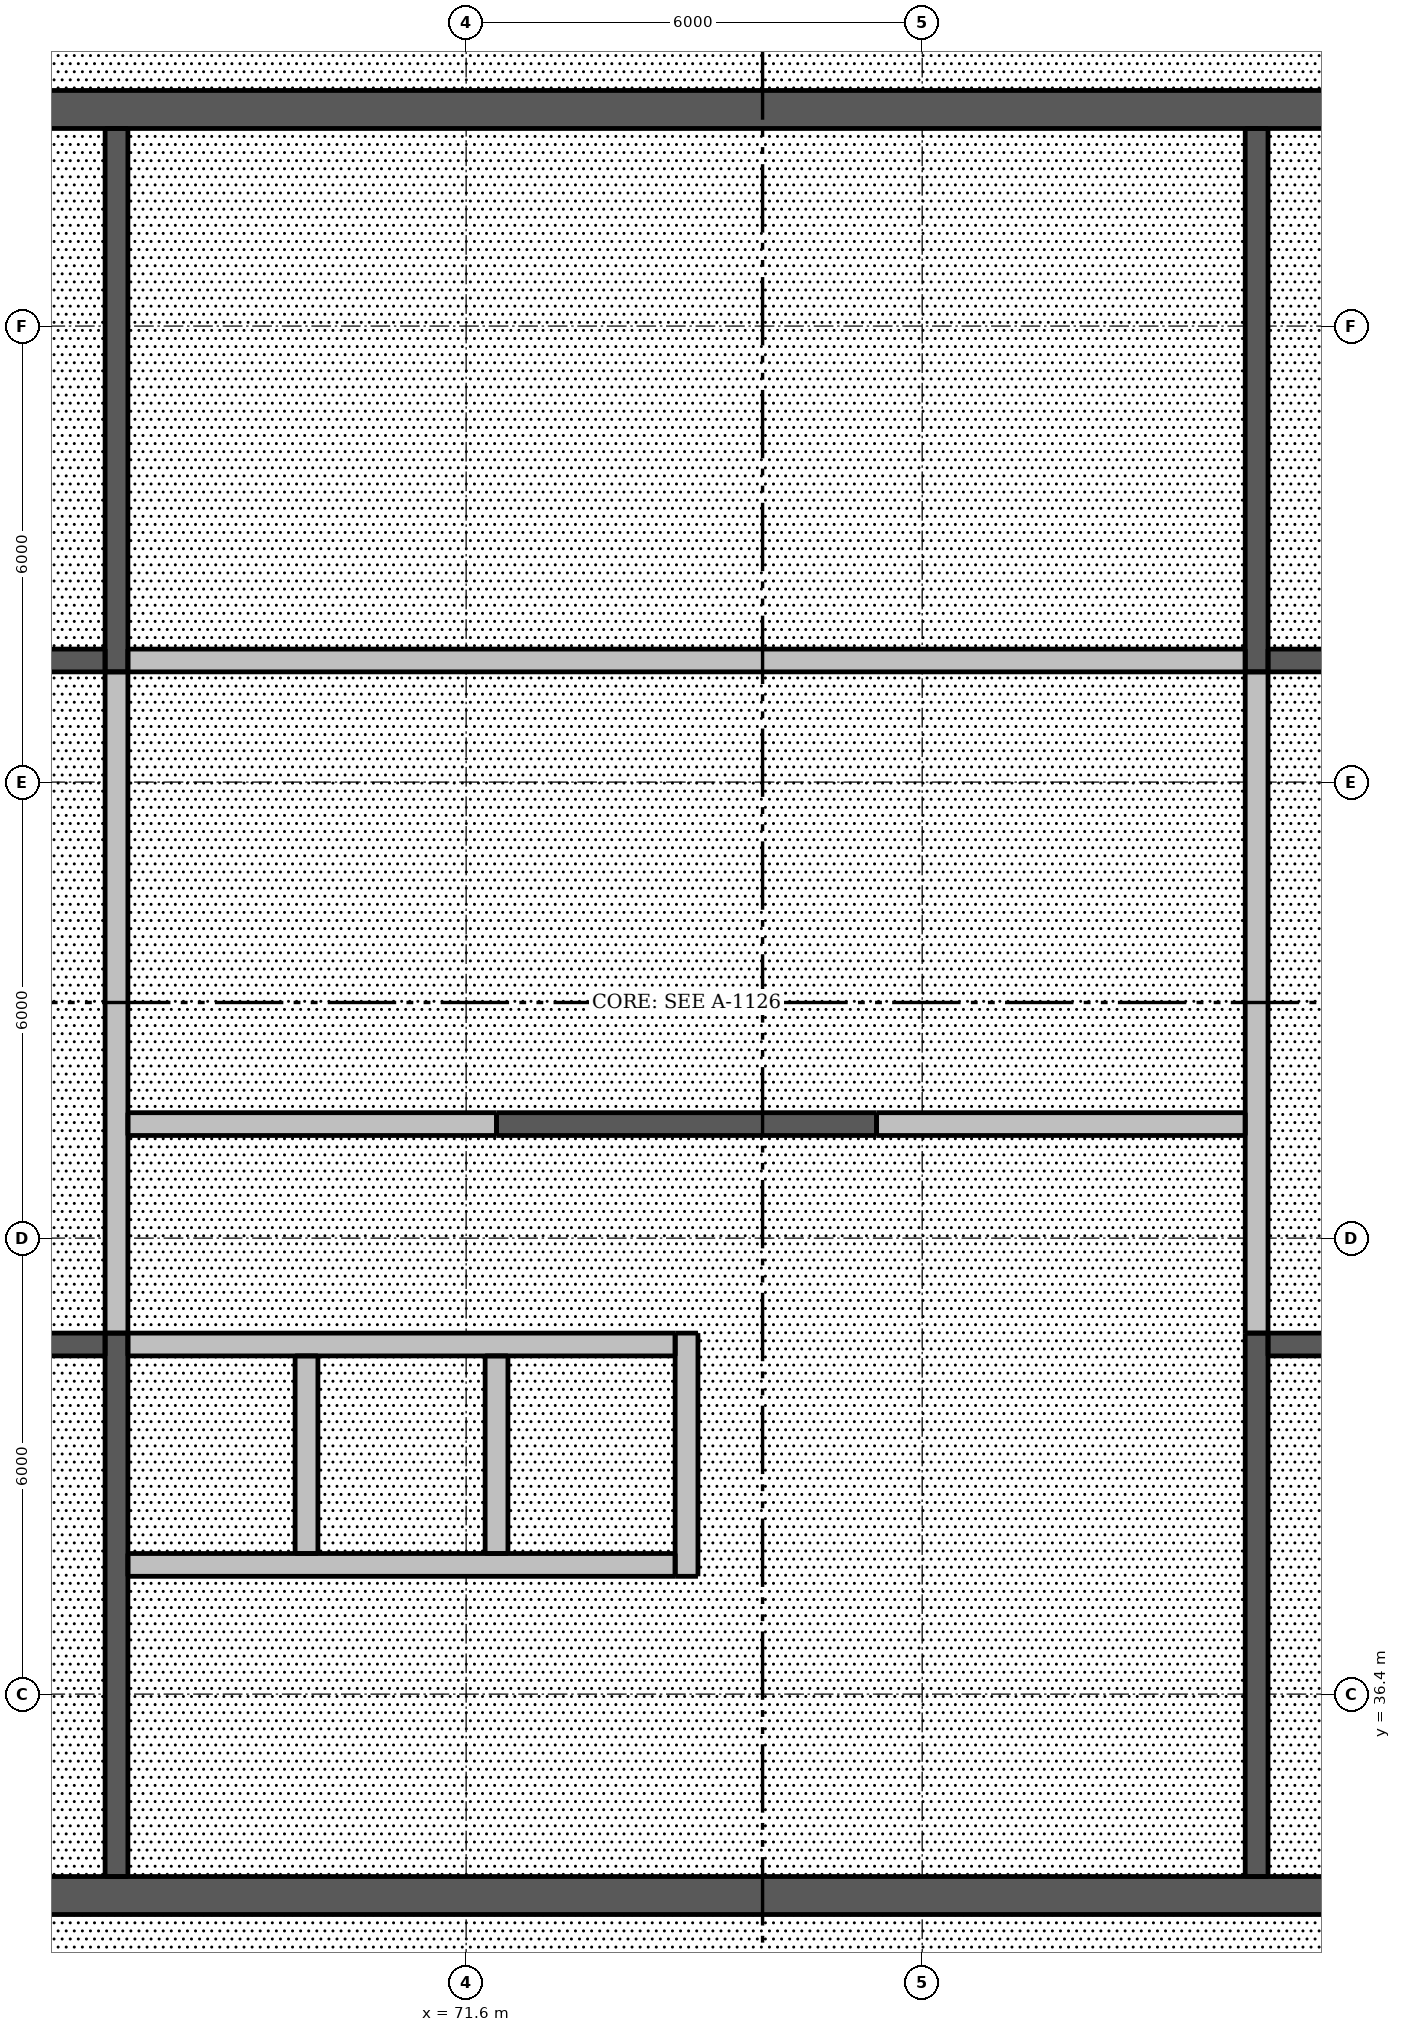
"""IFC4 building model, lengths in metres.
Left out: names, types, materials, properties, quantities, classifications, styles, units other than length and angle.
Written with IfcOpenShell. Run it as: python <this file> out.ifc"""

import sys

from ifc_helpers import new_model, si_unit, direction, frame, frame_2d, origin, place, context, subcontext, project, spatial, rectangle, extrude, element, fill, save


model = new_model("IFC4")
c1 = context("Model", 3, precision=1e-05, world=origin(), true_north=direction((0.0, 1.0)))
c2 = subcontext(c1, "Body", "Model", "MODEL_VIEW")
j1 = project(units=[si_unit("LENGTHUNIT", "METRE"), si_unit("PLANEANGLEUNIT", "RADIAN")], contexts=[c1])
p1 = place(None, origin())
s1 = spatial("IfcSite", under=j1, at=p1, CompositionType="ELEMENT")
p2 = place(p1, origin())
s2 = spatial("IfcBuilding", under=s1, at=p2, CompositionType="ELEMENT")
p3 = place(p2, frame((0.0, 0.0, 298.0)))
s3 = spatial("IfcBuildingStorey", under=s2, at=p3, CompositionType="ELEMENT", Elevation=298.0)
p4 = place(p3, frame((62.5, 33.75, 0.0), z_axis=(0.0, 0.0, 1.0), x_axis=(1.0, 0.0, 0.0)))
e1 = element("IfcWall", 1, at=p4, inside=s3, PredefinedType="SHEAR", context=c2, shape_type="SweptSolid", body=[
    extrude(rectangle(XDim=24.0, YDim=0.5, at=frame_2d((12.0, 0.0))), origin(), (0.0, 0.0, 1.0), 3.3),
])
p5 = place(p4, frame((1.875, 0.0, 0.0)))
e2 = element("IfcOpeningElement", 2, at=p5, cuts=e1, PredefinedType="OPENING", context=c2, shape_type="SweptSolid", body=[
    extrude(rectangle(XDim=1.1, YDim=2.1, at=frame_2d((0.55, 1.05))), frame((0.0, 0.26, 0.0), z_axis=(0.0, -1.0, 0.0), x_axis=(1.0, 0.0, 0.0)), (0.0, 0.0, 1.0), 0.52),
])
p6 = place(p4, frame((21.025, 0.0, 0.0)))
e3 = element("IfcOpeningElement", 3, at=p6, cuts=e1, PredefinedType="OPENING", context=c2, shape_type="SweptSolid", body=[
    extrude(rectangle(XDim=1.1, YDim=2.1, at=frame_2d((0.55, 1.05))), frame((0.0, 0.26, 0.0), z_axis=(0.0, -1.0, 0.0), x_axis=(1.0, 0.0, 0.0)), (0.0, 0.0, 1.0), 0.52),
])
p7 = place(p4, frame((11.55, 0.0, 0.0)))
e4 = element("IfcOpeningElement", 4, at=p7, cuts=e1, PredefinedType="OPENING", context=c2, shape_type="SweptSolid", body=[
    extrude(rectangle(XDim=0.9, YDim=2.1, at=frame_2d((0.45, 1.05))), frame((0.0, 0.26, 0.0), z_axis=(0.0, -1.0, 0.0), x_axis=(1.0, 0.0, 0.0)), (0.0, 0.0, 1.0), 0.52),
])
p8 = place(p3, frame((62.5, 57.25, 0.0), z_axis=(0.0, 0.0, 1.0), x_axis=(1.0, 0.0, 0.0)))
e5 = element("IfcWall", 5, at=p8, inside=s3, PredefinedType="SHEAR", context=c2, shape_type="SweptSolid", body=[
    extrude(rectangle(XDim=24.0, YDim=0.5, at=frame_2d((12.0, 0.0))), origin(), (0.0, 0.0, 1.0), 3.3),
])
p9 = place(p8, frame((21.025, 0.0, 0.0)))
e6 = element("IfcOpeningElement", 6, at=p9, cuts=e5, PredefinedType="OPENING", context=c2, shape_type="SweptSolid", body=[
    extrude(rectangle(XDim=1.1, YDim=2.1, at=frame_2d((0.55, 1.05))), frame((0.0, 0.26, 0.0), z_axis=(0.0, -1.0, 0.0), x_axis=(1.0, 0.0, 0.0)), (0.0, 0.0, 1.0), 0.52),
])
p10 = place(p8, frame((1.875, 0.0, 0.0)))
e7 = element("IfcOpeningElement", 7, at=p10, cuts=e5, PredefinedType="OPENING", context=c2, shape_type="SweptSolid", body=[
    extrude(rectangle(XDim=1.1, YDim=2.1, at=frame_2d((0.55, 1.05))), frame((0.0, 0.26, 0.0), z_axis=(0.0, -1.0, 0.0), x_axis=(1.0, 0.0, 0.0)), (0.0, 0.0, 1.0), 0.52),
])
p11 = place(p8, frame((11.55, 0.0, 0.0)))
e8 = element("IfcOpeningElement", 8, at=p11, cuts=e5, PredefinedType="OPENING", context=c2, shape_type="SweptSolid", body=[
    extrude(rectangle(XDim=0.9, YDim=2.1, at=frame_2d((0.45, 1.05))), frame((0.0, 0.26, 0.0), z_axis=(0.0, -1.0, 0.0), x_axis=(1.0, 0.0, 0.0)), (0.0, 0.0, 1.0), 0.52),
])
p12 = place(p3, frame((72.0, 43.9, 0.0), z_axis=(0.0, 0.0, 1.0), x_axis=(1.0, 0.0, 0.0)))
e9 = element("IfcWall", 9, at=p12, inside=s3, PredefinedType="SHEAR", context=c2, shape_type="SweptSolid", body=[
    extrude(rectangle(XDim=5.0, YDim=0.3, at=frame_2d((2.5, 0.0))), origin(), (0.0, 0.0, 1.0), 3.3),
])
p13 = place(p3, frame((67.0, 34.0, 0.0), z_axis=(0.0, 0.0, 1.0), x_axis=(0.0, 1.0, 0.0)))
e10 = element("IfcWall", 10, at=p13, inside=s3, PredefinedType="SHEAR", context=c2, shape_type="SweptSolid", body=[
    extrude(rectangle(XDim=7.15, YDim=0.3, at=frame_2d((3.575, 0.0))), origin(), (0.0, 0.0, 1.0), 3.3),
])
p14 = place(p13, frame((0.2, 0.0, 0.0)))
e11 = element("IfcOpeningElement", 11, at=p14, cuts=e10, PredefinedType="OPENING", context=c2, shape_type="SweptSolid", body=[
    extrude(rectangle(XDim=1.1, YDim=2.1, at=frame_2d((0.55, 1.05))), frame((0.0, 0.16, 0.0), z_axis=(0.0, -1.0, 0.0), x_axis=(1.0, 0.0, 0.0)), (0.0, 0.0, 1.0), 0.32),
])
p15 = place(p3, frame((67.0, 41.15, 0.0), z_axis=(0.0, 0.0, 1.0), x_axis=(0.0, 1.0, 0.0)))
e12 = element("IfcWall", 12, at=p15, inside=s3, PredefinedType="PARTITIONING", context=c2, shape_type="SweptSolid", body=[
    extrude(rectangle(XDim=8.7, YDim=0.3, at=frame_2d((4.35, 0.0))), origin(), (0.0, 0.0, 1.0), 3.3),
])
p16 = place(p15, frame((3.9, 0.0, 0.0)))
e13 = element("IfcOpeningElement", 13, at=p16, cuts=e12, PredefinedType="OPENING", context=c2, shape_type="SweptSolid", body=[
    extrude(rectangle(XDim=0.9, YDim=2.1, at=frame_2d((0.45, 1.05))), frame((0.0, 0.16, 0.0), z_axis=(0.0, -1.0, 0.0), x_axis=(1.0, 0.0, 0.0)), (0.0, 0.0, 1.0), 0.32),
])
p17 = place(p3, frame((67.0, 49.85, 0.0), z_axis=(0.0, 0.0, 1.0), x_axis=(0.0, 1.0, 0.0)))
e14 = element("IfcWall", 14, at=p17, inside=s3, PredefinedType="SHEAR", context=c2, shape_type="SweptSolid", body=[
    extrude(rectangle(XDim=7.15, YDim=0.3, at=frame_2d((3.575, 0.0))), origin(), (0.0, 0.0, 1.0), 3.3),
])
p18 = place(p17, frame((5.85, 0.0, 0.0)))
e15 = element("IfcOpeningElement", 15, at=p18, cuts=e14, PredefinedType="OPENING", context=c2, shape_type="SweptSolid", body=[
    extrude(rectangle(XDim=1.1, YDim=2.1, at=frame_2d((0.55, 1.05))), frame((0.0, 0.16, 0.0), z_axis=(0.0, -1.0, 0.0), x_axis=(1.0, 0.0, 0.0)), (0.0, 0.0, 1.0), 0.32),
])
p19 = place(p3, frame((82.0, 34.0, 0.0), z_axis=(0.0, 0.0, 1.0), x_axis=(0.0, 1.0, 0.0)))
e16 = element("IfcWall", 16, at=p19, inside=s3, PredefinedType="SHEAR", context=c2, shape_type="SweptSolid", body=[
    extrude(rectangle(XDim=7.15, YDim=0.3, at=frame_2d((3.575, 0.0))), origin(), (0.0, 0.0, 1.0), 3.3),
])
p20 = place(p19, frame((0.2, 0.0, 0.0)))
e17 = element("IfcOpeningElement", 17, at=p20, cuts=e16, PredefinedType="OPENING", context=c2, shape_type="SweptSolid", body=[
    extrude(rectangle(XDim=1.1, YDim=2.1, at=frame_2d((0.55, 1.05))), frame((0.0, 0.16, 0.0), z_axis=(0.0, -1.0, 0.0), x_axis=(1.0, 0.0, 0.0)), (0.0, 0.0, 1.0), 0.32),
])
p21 = place(p3, frame((82.0, 41.15, 0.0), z_axis=(0.0, 0.0, 1.0), x_axis=(0.0, 1.0, 0.0)))
e18 = element("IfcWall", 18, at=p21, inside=s3, PredefinedType="PARTITIONING", context=c2, shape_type="SweptSolid", body=[
    extrude(rectangle(XDim=8.7, YDim=0.3, at=frame_2d((4.35, 0.0))), origin(), (0.0, 0.0, 1.0), 3.3),
])
p22 = place(p21, frame((3.9, 0.0, 0.0)))
e19 = element("IfcOpeningElement", 19, at=p22, cuts=e18, PredefinedType="OPENING", context=c2, shape_type="SweptSolid", body=[
    extrude(rectangle(XDim=0.9, YDim=2.1, at=frame_2d((0.45, 1.05))), frame((0.0, 0.16, 0.0), z_axis=(0.0, -1.0, 0.0), x_axis=(1.0, 0.0, 0.0)), (0.0, 0.0, 1.0), 0.32),
])
p23 = place(p3, frame((82.0, 49.85, 0.0), z_axis=(0.0, 0.0, 1.0), x_axis=(0.0, 1.0, 0.0)))
e20 = element("IfcWall", 20, at=p23, inside=s3, PredefinedType="SHEAR", context=c2, shape_type="SweptSolid", body=[
    extrude(rectangle(XDim=7.15, YDim=0.3, at=frame_2d((3.575, 0.0))), origin(), (0.0, 0.0, 1.0), 3.3),
])
p24 = place(p23, frame((5.85, 0.0, 0.0)))
e21 = element("IfcOpeningElement", 21, at=p24, cuts=e20, PredefinedType="OPENING", context=c2, shape_type="SweptSolid", body=[
    extrude(rectangle(XDim=1.1, YDim=2.1, at=frame_2d((0.55, 1.05))), frame((0.0, 0.16, 0.0), z_axis=(0.0, -1.0, 0.0), x_axis=(1.0, 0.0, 0.0)), (0.0, 0.0, 1.0), 0.32),
])
for number, where, z_axis, x_axis in (
    (22, (63.0, 41.0, 0.0), (0.0, 0.0, 1.0), (1.0, 0.0, 0.0)),
    (23, (82.15, 41.0, 0.0), (0.0, 0.0, 1.0), (1.0, 0.0, 0.0)),
    (24, (63.0, 50.0, 0.0), (0.0, 0.0, 1.0), (1.0, 0.0, 0.0)),
    (25, (82.15, 50.0, 0.0), (0.0, 0.0, 1.0), (1.0, 0.0, 0.0)),
):
    element("IfcWall", number, at=place(p3, frame(where, z_axis=z_axis, x_axis=x_axis)), inside=s3, PredefinedType="SHEAR", context=c2, shape_type="SweptSolid", body=[
        extrude(rectangle(XDim=3.85, YDim=0.3, at=frame_2d((1.925, 0.0))), origin(), (0.0, 0.0, 1.0), 3.3),
    ])
p25 = place(p3, frame((67.15, 50.0, 0.0), z_axis=(0.0, 0.0, 1.0), x_axis=(1.0, 0.0, 0.0)))
e26 = element("IfcWall", 26, at=p25, inside=s3, PredefinedType="PARTITIONING", context=c2, shape_type="SweptSolid", body=[
    extrude(rectangle(XDim=14.7, YDim=0.3, at=frame_2d((7.35, 0.0))), origin(), (0.0, 0.0, 1.0), 3.3),
])
p26 = place(p25, frame((6.9, 0.0, 0.0)))
e27 = element("IfcOpeningElement", 27, at=p26, cuts=e26, PredefinedType="OPENING", context=c2, shape_type="SweptSolid", body=[
    extrude(rectangle(XDim=0.9, YDim=2.1, at=frame_2d((0.45, 1.05))), frame((0.0, 0.16, 0.0), z_axis=(0.0, -1.0, 0.0), x_axis=(1.0, 0.0, 0.0)), (0.0, 0.0, 1.0), 0.32),
])
p27 = place(p3, frame((67.15, 43.9, 0.0), z_axis=(0.0, 0.0, 1.0), x_axis=(1.0, 0.0, 0.0)))
e28 = element("IfcWall", 28, at=p27, inside=s3, PredefinedType="PARTITIONING", context=c2, shape_type="SweptSolid", body=[
    extrude(rectangle(XDim=4.85, YDim=0.3, at=frame_2d((2.425, 0.0))), origin(), (0.0, 0.0, 1.0), 3.3),
])
p28 = place(p27, frame((1.9, 0.0, 0.0)))
e29 = element("IfcOpeningElement", 29, at=p28, cuts=e28, PredefinedType="OPENING", context=c2, shape_type="SweptSolid", body=[
    extrude(rectangle(XDim=0.9, YDim=2.1, at=frame_2d((0.45, 1.05))), frame((0.0, 0.16, 0.0), z_axis=(0.0, -1.0, 0.0), x_axis=(1.0, 0.0, 0.0)), (0.0, 0.0, 1.0), 0.32),
])
p29 = place(p3, frame((77.0, 43.9, 0.0), z_axis=(0.0, 0.0, 1.0), x_axis=(1.0, 0.0, 0.0)))
e30 = element("IfcWall", 30, at=p29, inside=s3, PredefinedType="PARTITIONING", context=c2, shape_type="SweptSolid", body=[
    extrude(rectangle(XDim=4.85, YDim=0.3, at=frame_2d((2.425, 0.0))), origin(), (0.0, 0.0, 1.0), 3.3),
])
p30 = place(p3, frame((67.15, 38.1, 0.0), z_axis=(0.0, 0.0, 1.0), x_axis=(1.0, 0.0, 0.0)))
e31 = element("IfcWall", 31, at=p30, inside=s3, PredefinedType="PARTITIONING", context=c2, shape_type="SweptSolid", body=[
    extrude(rectangle(XDim=7.2, YDim=0.3, at=frame_2d((3.6, 0.0))), origin(), (0.0, 0.0, 1.0), 3.3),
])
p31 = place(p30, frame((0.55, 0.0, 0.0)))
e32 = element("IfcOpeningElement", 32, at=p31, cuts=e31, PredefinedType="OPENING", context=c2, shape_type="SweptSolid", body=[
    extrude(rectangle(XDim=1.1, YDim=2.1, at=frame_2d((0.55, 1.05))), frame((0.0, 0.16, 0.0), z_axis=(0.0, -1.0, 0.0), x_axis=(1.0, 0.0, 0.0)), (0.0, 0.0, 1.0), 0.32),
])
p32 = place(p30, frame((3.05, 0.0, 0.0)))
e33 = element("IfcOpeningElement", 33, at=p32, cuts=e31, PredefinedType="OPENING", context=c2, shape_type="SweptSolid", body=[
    extrude(rectangle(XDim=1.1, YDim=2.1, at=frame_2d((0.55, 1.05))), frame((0.0, 0.16, 0.0), z_axis=(0.0, -1.0, 0.0), x_axis=(1.0, 0.0, 0.0)), (0.0, 0.0, 1.0), 0.32),
])
p33 = place(p30, frame((5.5, 0.0, 0.0)))
e34 = element("IfcOpeningElement", 34, at=p33, cuts=e31, PredefinedType="OPENING", context=c2, shape_type="SweptSolid", body=[
    extrude(rectangle(XDim=1.2, YDim=2.1, at=frame_2d((0.6, 1.05))), frame((0.0, 0.16, 0.0), z_axis=(0.0, -1.0, 0.0), x_axis=(1.0, 0.0, 0.0)), (0.0, 0.0, 1.0), 0.32),
])
p34 = place(p3, frame((67.15, 41.0, 0.0), z_axis=(0.0, 0.0, 1.0), x_axis=(1.0, 0.0, 0.0)))
e35 = element("IfcWall", 35, at=p34, inside=s3, PredefinedType="PARTITIONING", context=c2, shape_type="SweptSolid", body=[
    extrude(rectangle(XDim=7.2, YDim=0.3, at=frame_2d((3.6, 0.0))), origin(), (0.0, 0.0, 1.0), 3.3),
])
for number, where, z_axis, x_axis in (
    (36, (69.5, 38.25, 0.0), (0.0, 0.0, 1.0), (0.0, 1.0, 0.0)),
    (37, (72.0, 38.25, 0.0), (0.0, 0.0, 1.0), (0.0, 1.0, 0.0)),
):
    element("IfcWall", number, at=place(p3, frame(where, z_axis=z_axis, x_axis=x_axis)), inside=s3, PredefinedType="PARTITIONING", context=c2, shape_type="SweptSolid", body=[
        extrude(rectangle(XDim=2.6, YDim=0.3, at=frame_2d((1.3, 0.0))), origin(), (0.0, 0.0, 1.0), 3.3),
    ])
p35 = place(p3, frame((74.5, 37.95, 0.0), z_axis=(0.0, 0.0, 1.0), x_axis=(0.0, 1.0, 0.0)))
e38 = element("IfcWall", 38, at=p35, inside=s3, PredefinedType="PARTITIONING", context=c2, shape_type="SweptSolid", body=[
    extrude(rectangle(XDim=3.2, YDim=0.3, at=frame_2d((1.6, 0.0))), origin(), (0.0, 0.0, 1.0), 3.3),
])
p36 = place(p14, origin())
e39 = element("IfcDoor", 39, at=p36, inside=s3, OperationType="SINGLE_SWING_LEFT", PredefinedType="DOOR", context=c2, shape_type="SweptSolid", body=[
    extrude(rectangle(XDim=1.1, YDim=2.1, at=frame_2d((0.55, 1.05))), frame((0.0, 0.138, 0.0), z_axis=(0.0, -1.0, 0.0), x_axis=(1.0, 0.0, 0.0)), (0.0, 0.0, 1.0), 0.05),
])
fill(e11, e39)
p37 = place(p20, origin())
e40 = element("IfcDoor", 40, at=p37, inside=s3, OperationType="SINGLE_SWING_RIGHT", PredefinedType="DOOR", context=c2, shape_type="SweptSolid", body=[
    extrude(rectangle(XDim=1.1, YDim=2.1, at=frame_2d((0.55, 1.05))), frame((0.0, -0.087, 0.0), z_axis=(0.0, -1.0, 0.0), x_axis=(1.0, 0.0, 0.0)), (0.0, 0.0, 1.0), 0.05),
])
fill(e17, e40)
p38 = place(p18, origin())
e41 = element("IfcDoor", 41, at=p38, inside=s3, OperationType="SINGLE_SWING_LEFT", PredefinedType="DOOR", context=c2, shape_type="SweptSolid", body=[
    extrude(rectangle(XDim=1.1, YDim=2.1, at=frame_2d((0.55, 1.05))), frame((0.0, 0.138, 0.0), z_axis=(0.0, -1.0, 0.0), x_axis=(1.0, 0.0, 0.0)), (0.0, 0.0, 1.0), 0.05),
])
fill(e15, e41)
p39 = place(p24, origin())
e42 = element("IfcDoor", 42, at=p39, inside=s3, OperationType="SINGLE_SWING_RIGHT", PredefinedType="DOOR", context=c2, shape_type="SweptSolid", body=[
    extrude(rectangle(XDim=1.1, YDim=2.1, at=frame_2d((0.55, 1.05))), frame((0.0, -0.087, 0.0), z_axis=(0.0, -1.0, 0.0), x_axis=(1.0, 0.0, 0.0)), (0.0, 0.0, 1.0), 0.05),
])
fill(e21, e42)
p40 = place(p28, origin())
e43 = element("IfcDoor", 43, at=p40, inside=s3, OperationType="SINGLE_SWING_LEFT", PredefinedType="DOOR", context=c2, shape_type="SweptSolid", body=[
    extrude(rectangle(XDim=0.9, YDim=2.1, at=frame_2d((0.45, 1.05))), frame((0.0, 0.138, 0.0), z_axis=(0.0, -1.0, 0.0), x_axis=(1.0, 0.0, 0.0)), (0.0, 0.0, 1.0), 0.05),
])
fill(e29, e43)
p41 = place(p26, origin())
e44 = element("IfcDoor", 44, at=p41, inside=s3, OperationType="SINGLE_SWING_RIGHT", PredefinedType="DOOR", context=c2, shape_type="SweptSolid", body=[
    extrude(rectangle(XDim=0.9, YDim=2.1, at=frame_2d((0.45, 1.05))), frame((0.0, -0.087, 0.0), z_axis=(0.0, -1.0, 0.0), x_axis=(1.0, 0.0, 0.0)), (0.0, 0.0, 1.0), 0.05),
])
fill(e27, e44)
p42 = place(p16, origin())
e45 = element("IfcDoor", 45, at=p42, inside=s3, OperationType="SINGLE_SWING_LEFT", PredefinedType="DOOR", context=c2, shape_type="SweptSolid", body=[
    extrude(rectangle(XDim=0.9, YDim=2.1, at=frame_2d((0.45, 1.05))), frame((0.0, 0.138, 0.0), z_axis=(0.0, -1.0, 0.0), x_axis=(1.0, 0.0, 0.0)), (0.0, 0.0, 1.0), 0.05),
])
fill(e13, e45)
p43 = place(p22, origin())
e46 = element("IfcDoor", 46, at=p43, inside=s3, OperationType="SINGLE_SWING_RIGHT", PredefinedType="DOOR", context=c2, shape_type="SweptSolid", body=[
    extrude(rectangle(XDim=0.9, YDim=2.1, at=frame_2d((0.45, 1.05))), frame((0.0, -0.087, 0.0), z_axis=(0.0, -1.0, 0.0), x_axis=(1.0, 0.0, 0.0)), (0.0, 0.0, 1.0), 0.05),
])
fill(e19, e46)
p44 = place(p7, origin())
e47 = element("IfcDoor", 47, at=p44, inside=s3, OperationType="SINGLE_SWING_LEFT", PredefinedType="DOOR", context=c2, shape_type="SweptSolid", body=[
    extrude(rectangle(XDim=0.9, YDim=2.1, at=frame_2d((0.45, 1.05))), frame((0.0, 0.237, 0.0), z_axis=(0.0, -1.0, 0.0), x_axis=(1.0, 0.0, 0.0)), (0.0, 0.0, 1.0), 0.05),
])
fill(e4, e47)
p45 = place(p11, origin())
e48 = element("IfcDoor", 48, at=p45, inside=s3, OperationType="SINGLE_SWING_RIGHT", PredefinedType="DOOR", context=c2, shape_type="SweptSolid", body=[
    extrude(rectangle(XDim=0.9, YDim=2.1, at=frame_2d((0.45, 1.05))), frame((0.0, -0.188, 0.0), z_axis=(0.0, -1.0, 0.0), x_axis=(1.0, 0.0, 0.0)), (0.0, 0.0, 1.0), 0.05),
])
fill(e8, e48)
p46 = place(p31, origin())
e49 = element("IfcDoor", 49, at=p46, inside=s3, OperationType="DOUBLE_DOOR_SLIDING", PredefinedType="DOOR", context=c2, shape_type="SweptSolid", body=[
    extrude(rectangle(XDim=1.1, YDim=2.1, at=frame_2d((0.55, 1.05))), frame((0.0, 0.025, 0.0), z_axis=(0.0, -1.0, 0.0), x_axis=(1.0, 0.0, 0.0)), (0.0, 0.0, 1.0), 0.05),
])
fill(e32, e49)
p47 = place(p32, origin())
e50 = element("IfcDoor", 50, at=p47, inside=s3, OperationType="DOUBLE_DOOR_SLIDING", PredefinedType="DOOR", context=c2, shape_type="SweptSolid", body=[
    extrude(rectangle(XDim=1.1, YDim=2.1, at=frame_2d((0.55, 1.05))), frame((0.0, 0.025, 0.0), z_axis=(0.0, -1.0, 0.0), x_axis=(1.0, 0.0, 0.0)), (0.0, 0.0, 1.0), 0.05),
])
fill(e33, e50)
p48 = place(p33, origin())
e51 = element("IfcDoor", 51, at=p48, inside=s3, OperationType="DOUBLE_DOOR_SLIDING", PredefinedType="DOOR", context=c2, shape_type="SweptSolid", body=[
    extrude(rectangle(XDim=1.2, YDim=2.1, at=frame_2d((0.6, 1.05))), frame((0.0, 0.025, 0.0), z_axis=(0.0, -1.0, 0.0), x_axis=(1.0, 0.0, 0.0)), (0.0, 0.0, 1.0), 0.05),
])
fill(e34, e51)
save(model, sys.argv[1])
